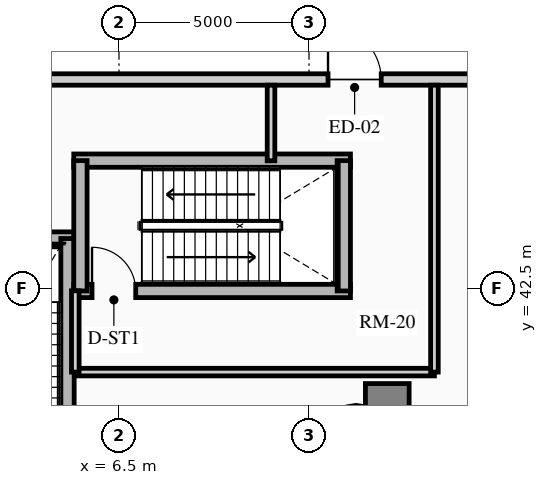
"""IFC4 building model, lengths in metres.
Left out: names, types, materials, properties, quantities, classifications, styles, units other than length and angle.
Written with IfcOpenShell. Run it as: python <this file> out.ifc"""

import sys

from ifc_helpers import new_model, si_unit, direction, frame, frame_2d, origin, origin_2d, place, context, subcontext, project, spatial, rectangle, circle, extrude, source, transform, mapped, element, fill, save


model = new_model("IFC4")
c1 = context("Model", 3, precision=1e-05, world=origin(), true_north=direction((0.0, 1.0)))
c2 = subcontext(c1, "Body", "Model", "MODEL_VIEW")
j1 = project(units=[si_unit("LENGTHUNIT", "METRE"), si_unit("PLANEANGLEUNIT", "RADIAN")], contexts=[c1])
p1 = place(None, origin())
s1 = spatial("IfcSite", under=j1, at=p1, CompositionType="ELEMENT")
p2 = place(p1, origin())
s2 = spatial("IfcBuilding", under=s1, at=p2, CompositionType="ELEMENT")
p3 = place(p2, origin())
s3 = spatial("IfcBuildingStorey", under=s2, at=p3, CompositionType="ELEMENT", Elevation=0.0)
p4 = place(p3, frame((1.54, 43.815, 0.0), z_axis=(0.0, 0.0, 1.0), x_axis=(1.0, 0.0, 0.0)))
e1 = element("IfcWall", 1, at=p4, inside=s3, PredefinedType="SHEAR", context=c2, shape_type="SweptSolid", body=[
    extrude(rectangle(XDim=3.78, YDim=0.35, at=frame_2d((1.89, 0.0))), origin(), (0.0, 0.0, 1.0), 4.8),
])
p5 = place(p3, frame((5.145, 36.885, 0.0), z_axis=(0.0, 0.0, 1.0), x_axis=(0.0, 1.0, 0.0)))
e2 = element("IfcWall", 2, at=p5, inside=s3, PredefinedType="SHEAR", context=c2, shape_type="SweptSolid", body=[
    extrude(rectangle(XDim=6.93, YDim=0.35, at=frame_2d((3.465, 0.0))), origin(), (0.0, 0.0, 1.0), 4.8),
])
p6 = place(p3, frame((5.31, 42.435, 0.0), z_axis=(0.0, 0.0, 1.0), x_axis=(1.0, 0.0, 0.0)))
e3 = element("IfcWall", 3, at=p6, inside=s3, PredefinedType="SHEAR", context=c2, shape_type="SweptSolid", body=[
    extrude(rectangle(XDim=7.28, YDim=0.35, at=frame_2d((3.64, 0.0))), origin(), (0.0, 0.0, 1.0), 4.8),
])
m1 = source(origin(), c2, "Body", "SweptSolid", [
    extrude(rectangle(XDim=1.15, YDim=2.02, at=frame_2d((0.575, 1.01))), frame((0.0, 0.185, 0.0), z_axis=(0.0, -1.0, 0.0), x_axis=(1.0, 0.0, 0.0)), (0.0, 0.0, 1.0), 0.37),
])
p7 = place(p6, frame((0.48, 0.0, 0.0)))
e4 = element("IfcOpeningElement", 4, at=p7, cuts=e3, PredefinedType="OPENING", context=c2, shape_type="MappedRepresentation", body=[
    mapped(m1, transform((0.0, 0.0, 0.0), x_axis=(1.0, 0.0, 0.0), y_axis=(0.0, 1.0, 0.0), z_axis=(0.0, 0.0, 1.0), scale=1.0)),
])
p8 = place(p3, frame((5.31, 45.865, 0.0), z_axis=(0.0, 0.0, 1.0), x_axis=(1.0, 0.0, 0.0)))
e5 = element("IfcWall", 5, at=p8, inside=s3, PredefinedType="SHEAR", context=c2, shape_type="SweptSolid", body=[
    extrude(rectangle(XDim=7.28, YDim=0.35, at=frame_2d((3.64, 0.0))), origin(), (0.0, 0.0, 1.0), 4.8),
])
for number, where, z_axis, x_axis in (
    (6, (5.485, 42.435, 0.0), (0.0, 0.0, 1.0), (0.0, 1.0, 0.0)),
    (7, (12.415, 42.435, 0.0), (0.0, 0.0, 1.0), (0.0, 1.0, 0.0)),
):
    element("IfcWall", number, at=place(p3, frame(where, z_axis=z_axis, x_axis=x_axis)), inside=s3, PredefinedType="SHEAR", context=c2, shape_type="SweptSolid", body=[
        extrude(rectangle(XDim=3.43, YDim=0.35, at=frame_2d((1.715, 0.0))), origin(), (0.0, 0.0, 1.0), 4.8),
    ])
p9 = place(p3, frame((12.739, 38.623, 0.0), z_axis=(0.0, 0.0, 1.0), x_axis=(1.0, 0.0, 0.0)))
e8 = element("IfcColumn", 8, at=p9, inside=s3, PredefinedType="USERDEFINED", context=c2, shape_type="SweptSolid", body=[
    extrude(circle(Radius=0.8, at=origin_2d()), origin(), (0.0, 0.0, 1.0), 4.8),
])
p10 = place(p3, frame((3.8, 48.0, 0.0), z_axis=(0.0, 0.0, 1.0), x_axis=(1.0, 0.0, 0.0)))
e9 = element("IfcWall", 9, at=p10, inside=s3, PredefinedType="SOLIDWALL", context=c2, shape_type="SweptSolid", body=[
    extrude(rectangle(XDim=74.5, YDim=0.3, at=frame_2d((37.25, 0.0))), origin(), (0.0, 0.0, 1.0), 4.485),
])
m2 = source(origin(), c2, "Body", "SweptSolid", [
    extrude(rectangle(XDim=1.4, YDim=2.15, at=frame_2d((0.7, 1.075))), frame((0.0, 0.16, 0.0), z_axis=(0.0, -1.0, 0.0), x_axis=(1.0, 0.0, 0.0)), (0.0, 0.0, 1.0), 0.32),
])
p11 = place(p10, frame((8.2, 0.0, 0.0)))
e10 = element("IfcOpeningElement", 10, at=p11, cuts=e9, PredefinedType="OPENING", context=c2, shape_type="MappedRepresentation", body=[
    mapped(m2, transform((0.0, 0.0, 0.0), x_axis=(1.0, 0.0, 0.0), y_axis=(0.0, 1.0, 0.0), z_axis=(0.0, 0.0, 1.0), scale=1.0)),
])
m3 = source(origin(), c2, "Body", "SweptSolid", [
    extrude(rectangle(XDim=2.0, YDim=2.25, at=frame_2d((1.0, 1.125))), frame((0.0, 0.16, 0.0), z_axis=(0.0, -1.0, 0.0), x_axis=(1.0, 0.0, 0.0)), (0.0, 0.0, 1.0), 0.32),
])
p12 = place(p10, frame((13.0, 0.0, 0.0)))
e11 = element("IfcOpeningElement", 11, at=p12, cuts=e9, PredefinedType="OPENING", context=c2, shape_type="MappedRepresentation", body=[
    mapped(m3, transform((0.0, 0.0, 0.0), x_axis=(1.0, 0.0, 0.0), y_axis=(0.0, 1.0, 0.0), z_axis=(0.0, 0.0, 1.0), scale=1.0)),
])
p13 = place(p10, frame((23.6, 0.0, 0.0)))
e12 = element("IfcOpeningElement", 12, at=p13, cuts=e9, PredefinedType="OPENING", context=c2, shape_type="MappedRepresentation", body=[
    mapped(m2, transform((0.0, 0.0, 0.0), x_axis=(1.0, 0.0, 0.0), y_axis=(0.0, 1.0, 0.0), z_axis=(0.0, 0.0, 1.0), scale=1.0)),
])
p14 = place(p10, frame((27.9, 0.0, 0.0)))
e13 = element("IfcOpeningElement", 13, at=p14, cuts=e9, PredefinedType="OPENING", context=c2, shape_type="MappedRepresentation", body=[
    mapped(m3, transform((0.0, 0.0, 0.0), x_axis=(1.0, 0.0, 0.0), y_axis=(0.0, 1.0, 0.0), z_axis=(0.0, 0.0, 1.0), scale=1.0)),
])
p15 = place(p10, frame((51.0, 0.0, 0.0)))
e14 = element("IfcOpeningElement", 14, at=p15, cuts=e9, PredefinedType="OPENING", context=c2, shape_type="MappedRepresentation", body=[
    mapped(m3, transform((0.0, 0.0, 0.0), x_axis=(1.0, 0.0, 0.0), y_axis=(0.0, 1.0, 0.0), z_axis=(0.0, 0.0, 1.0), scale=1.0)),
])
p16 = place(p10, frame((57.5, 0.0, 0.0)))
e15 = element("IfcOpeningElement", 15, at=p16, cuts=e9, PredefinedType="OPENING", context=c2, shape_type="MappedRepresentation", body=[
    mapped(m3, transform((0.0, 0.0, 0.0), x_axis=(1.0, 0.0, 0.0), y_axis=(0.0, 1.0, 0.0), z_axis=(0.0, 0.0, 1.0), scale=1.0)),
])
p17 = place(p3, frame((5.35, 40.3, 0.0), z_axis=(0.0, 0.0, 1.0), x_axis=(1.0, 0.0, 0.0)))
e16 = element("IfcWall", 16, at=p17, inside=s3, PredefinedType="PARTITIONING", context=c2, shape_type="SweptSolid", body=[
    extrude(rectangle(XDim=9.45, YDim=0.2, at=frame_2d((4.725, 0.0))), origin(), (0.0, 0.0, 1.0), 4.485),
])
p18 = place(p3, frame((5.35, 40.3, 0.0), z_axis=(0.0, 0.0, 1.0), x_axis=(0.0, 1.0, 0.0)))
e17 = element("IfcWall", 17, at=p18, inside=s3, PredefinedType="PARTITIONING", context=c2, shape_type="SweptSolid", body=[
    extrude(rectangle(XDim=2.14, YDim=0.2, at=frame_2d((1.07, 0.0))), origin(), (0.0, 0.0, 1.0), 4.485),
])
p19 = place(p3, frame((14.8, 40.3, 0.0), z_axis=(0.0, 0.0, 1.0), x_axis=(0.0, 1.0, 0.0)))
e18 = element("IfcWall", 18, at=p19, inside=s3, PredefinedType="PARTITIONING", context=c2, shape_type="SweptSolid", body=[
    extrude(rectangle(XDim=7.55, YDim=0.2, at=frame_2d((3.775, 0.0))), origin(), (0.0, 0.0, 1.0), 4.485),
])
p20 = place(p3, frame((10.5, 45.86, 0.0), z_axis=(0.0, 0.0, 1.0), x_axis=(0.0, 1.0, 0.0)))
e19 = element("IfcWall", 19, at=p20, inside=s3, PredefinedType="PARTITIONING", context=c2, shape_type="SweptSolid", body=[
    extrude(rectangle(XDim=1.99, YDim=0.2, at=frame_2d((0.995, 0.0))), origin(), (0.0, 0.0, 1.0), 4.485),
])
m4 = source(origin(), c2, "Body", "SweptSolid", [
    extrude(rectangle(XDim=1.4, YDim=2.15, at=frame_2d((0.7, 1.075))), frame((0.0, 0.025, 0.0), z_axis=(0.0, -1.0, 0.0), x_axis=(1.0, 0.0, 0.0)), (0.0, 0.0, 1.0), 0.05),
])
p21 = place(p11, origin())
e20 = element("IfcDoor", 20, at=p21, inside=s3, OperationType="SINGLE_SWING_LEFT", PredefinedType="DOOR", context=c2, shape_type="MappedRepresentation", body=[
    mapped(m4, transform((0.0, 0.0, 0.0), x_axis=(1.0, 0.0, 0.0), y_axis=(0.0, 1.0, 0.0), z_axis=(0.0, 0.0, 1.0), scale=1.0)),
])
fill(e10, e20)
m5 = source(origin(), c2, "Body", "SweptSolid", [
    extrude(rectangle(XDim=1.15, YDim=2.02, at=frame_2d((0.575, 1.01))), frame((0.0, 0.025, 0.0), z_axis=(0.0, -1.0, 0.0), x_axis=(1.0, 0.0, 0.0)), (0.0, 0.0, 1.0), 0.05),
])
p22 = place(p7, origin())
e21 = element("IfcDoor", 21, at=p22, inside=s3, OperationType="SINGLE_SWING_LEFT", PredefinedType="DOOR", context=c2, shape_type="MappedRepresentation", body=[
    mapped(m5, transform((0.0, 0.0, 0.0), x_axis=(1.0, 0.0, 0.0), y_axis=(0.0, 1.0, 0.0), z_axis=(0.0, 0.0, 1.0), scale=1.0)),
])
fill(e4, e21)
save(model, sys.argv[1])
